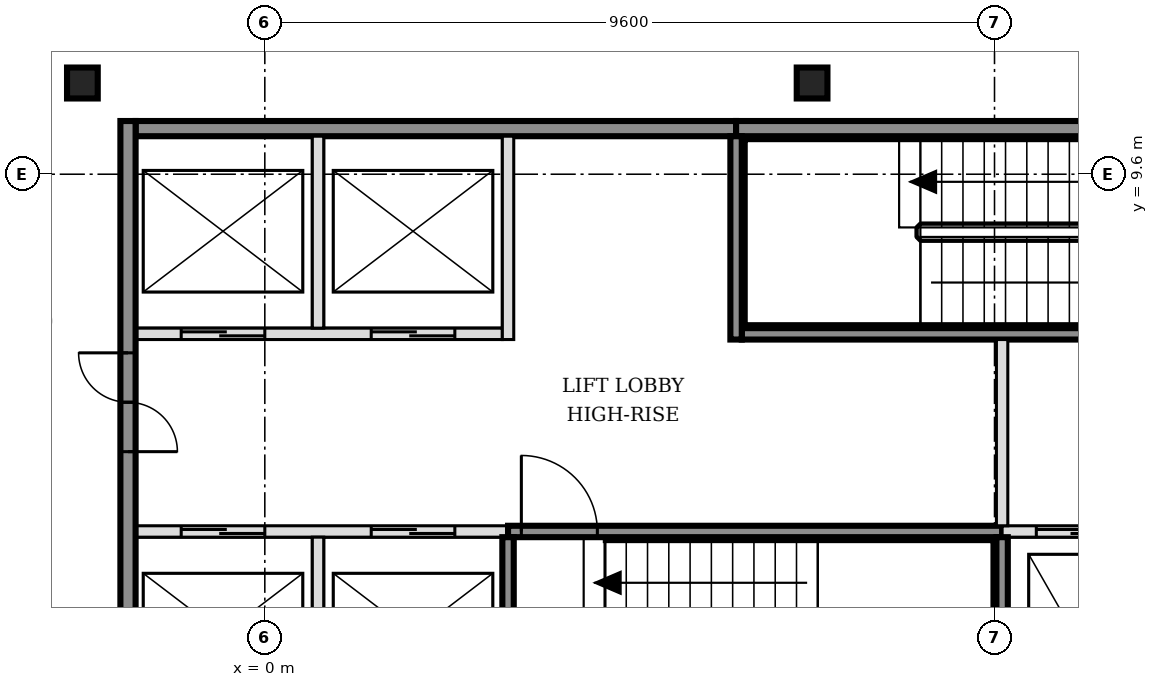
"""IFC4 building model, lengths in metres.
Left out: names, types, materials, properties, quantities, classifications, styles, units other than length and angle.
Written with IfcOpenShell. Run it as: python <this file> out.ifc"""

import sys

from ifc_helpers import new_model, si_unit, direction, frame, frame_2d, origin, origin_2d, place, context, subcontext, project, spatial, rectangle, i_section, extrude, element, fill, save


model = new_model("IFC4")
c1 = context("Model", 3, precision=1e-05, world=origin(), true_north=direction((0.0, 1.0)))
c2 = subcontext(c1, "Body", "Model", "MODEL_VIEW")
j1 = project(units=[si_unit("LENGTHUNIT", "METRE"), si_unit("PLANEANGLEUNIT", "RADIAN")], contexts=[c1])
p1 = place(None, origin())
s1 = spatial("IfcSite", under=j1, at=p1, CompositionType="ELEMENT")
p2 = place(p1, origin())
s2 = spatial("IfcBuilding", under=s1, at=p2, CompositionType="ELEMENT")
p3 = place(p2, frame((0.0, 0.0, 217.8)))
s3 = spatial("IfcBuildingStorey", under=s2, at=p3, CompositionType="ELEMENT", Elevation=217.8)
for number, where, z_axis, x_axis in (
    (1, (-2.4, 10.8, -0.15), (0.0, 0.0, 1.0), (1.0, 0.0, 0.0)),
    (2, (7.2, 10.8, -0.15), (0.0, 0.0, 1.0), (1.0, 0.0, 0.0)),
):
    element("IfcColumn", number, at=place(p3, frame(where, z_axis=z_axis, x_axis=x_axis)), inside=s3, PredefinedType="COLUMN", context=c2, shape_type="SweptSolid", body=[
        extrude(i_section(OverallWidth=0.404, OverallDepth=0.407, WebThickness=0.027, FlangeThickness=0.044, FilletRadius=0.015, at=origin_2d()), origin(), (0.0, 0.0, 1.0), 3.6),
    ])
p4 = place(p3, frame((-1.7, 4.9, 0.0), z_axis=(0.0, 0.0, 1.0), x_axis=(1.0, 0.0, 0.0)))
e3 = element("IfcWall", 3, at=p4, inside=s3, PredefinedType="SOLIDWALL", context=c2, shape_type="SweptSolid", body=[
    extrude(rectangle(XDim=4.9, YDim=0.15, at=frame_2d((2.45, 0.0))), origin(), (0.0, 0.0, 1.0), 3.45),
])
p5 = place(p4, frame((0.6, 0.0, 0.0)))
e4 = element("IfcOpeningElement", 4, at=p5, cuts=e3, PredefinedType="OPENING", context=c2, shape_type="SweptSolid", body=[
    extrude(rectangle(XDim=1.1, YDim=2.1, at=frame_2d((0.55, 1.05))), frame((0.0, 0.085, 0.0), z_axis=(0.0, -1.0, 0.0), x_axis=(1.0, 0.0, 0.0)), (0.0, 0.0, 1.0), 0.17),
])
p6 = place(p4, frame((3.1, 0.0, 0.0)))
e5 = element("IfcOpeningElement", 5, at=p6, cuts=e3, PredefinedType="OPENING", context=c2, shape_type="SweptSolid", body=[
    extrude(rectangle(XDim=1.1, YDim=2.1, at=frame_2d((0.55, 1.05))), frame((0.0, 0.085, 0.0), z_axis=(0.0, -1.0, 0.0), x_axis=(1.0, 0.0, 0.0)), (0.0, 0.0, 1.0), 0.17),
])
p7 = place(p3, frame((3.2, 4.9, 0.0), z_axis=(0.0, 0.0, 1.0), x_axis=(1.0, 0.0, 0.0)))
e6 = element("IfcWall", 6, at=p7, inside=s3, PredefinedType="SOLIDWALL", context=c2, shape_type="SweptSolid", body=[
    extrude(rectangle(XDim=6.5, YDim=0.15, at=frame_2d((3.25, 0.0))), origin(), (0.0, 0.0, 1.0), 3.45),
])
p8 = place(p7, frame((0.175, 0.0, 0.0)))
e7 = element("IfcOpeningElement", 7, at=p8, cuts=e6, PredefinedType="OPENING", context=c2, shape_type="SweptSolid", body=[
    extrude(rectangle(XDim=1.0, YDim=2.1, at=frame_2d((0.5, 1.05))), frame((0.0, 0.085, 0.0), z_axis=(0.0, -1.0, 0.0), x_axis=(1.0, 0.0, 0.0)), (0.0, 0.0, 1.0), 0.17),
])
p9 = place(p3, frame((9.7, 4.9, 0.0), z_axis=(0.0, 0.0, 1.0), x_axis=(1.0, 0.0, 0.0)))
e8 = element("IfcWall", 8, at=p9, inside=s3, PredefinedType="SOLIDWALL", context=c2, shape_type="SweptSolid", body=[
    extrude(rectangle(XDim=6.4, YDim=0.15, at=frame_2d((3.2, 0.0))), origin(), (0.0, 0.0, 1.0), 3.45),
])
p10 = place(p9, frame((0.45, 0.0, 0.0)))
e9 = element("IfcOpeningElement", 9, at=p10, cuts=e8, PredefinedType="OPENING", context=c2, shape_type="SweptSolid", body=[
    extrude(rectangle(XDim=1.0, YDim=2.1, at=frame_2d((0.5, 1.05))), frame((0.0, 0.085, 0.0), z_axis=(0.0, -1.0, 0.0), x_axis=(1.0, 0.0, 0.0)), (0.0, 0.0, 1.0), 0.17),
])
p11 = place(p9, frame((2.35, 0.0, 0.0)))
e10 = element("IfcOpeningElement", 10, at=p11, cuts=e8, PredefinedType="OPENING", context=c2, shape_type="SweptSolid", body=[
    extrude(rectangle(XDim=1.0, YDim=2.1, at=frame_2d((0.5, 1.05))), frame((0.0, 0.085, 0.0), z_axis=(0.0, -1.0, 0.0), x_axis=(1.0, 0.0, 0.0)), (0.0, 0.0, 1.0), 0.17),
])
p12 = place(p9, frame((4.7, 0.0, 0.0)))
e11 = element("IfcOpeningElement", 11, at=p12, cuts=e8, PredefinedType="OPENING", context=c2, shape_type="SweptSolid", body=[
    extrude(rectangle(XDim=0.9, YDim=2.1, at=frame_2d((0.45, 1.05))), frame((0.0, 0.085, 0.0), z_axis=(0.0, -1.0, 0.0), x_axis=(1.0, 0.0, 0.0)), (0.0, 0.0, 1.0), 0.17),
])
p13 = place(p3, frame((-1.7, 7.5, 0.0), z_axis=(0.0, 0.0, 1.0), x_axis=(1.0, 0.0, 0.0)))
e12 = element("IfcWall", 12, at=p13, inside=s3, PredefinedType="SOLIDWALL", context=c2, shape_type="SweptSolid", body=[
    extrude(rectangle(XDim=4.825, YDim=0.15, at=frame_2d((2.413, 0.0))), origin(), (0.0, 0.0, 1.0), 3.45),
])
p14 = place(p13, frame((0.6, 0.0, 0.0)))
e13 = element("IfcOpeningElement", 13, at=p14, cuts=e12, PredefinedType="OPENING", context=c2, shape_type="SweptSolid", body=[
    extrude(rectangle(XDim=1.1, YDim=2.1, at=frame_2d((0.55, 1.05))), frame((0.0, 0.085, 0.0), z_axis=(0.0, -1.0, 0.0), x_axis=(1.0, 0.0, 0.0)), (0.0, 0.0, 1.0), 0.17),
])
p15 = place(p13, frame((3.1, 0.0, 0.0)))
e14 = element("IfcOpeningElement", 14, at=p15, cuts=e12, PredefinedType="OPENING", context=c2, shape_type="SweptSolid", body=[
    extrude(rectangle(XDim=1.1, YDim=2.1, at=frame_2d((0.55, 1.05))), frame((0.0, 0.085, 0.0), z_axis=(0.0, -1.0, 0.0), x_axis=(1.0, 0.0, 0.0)), (0.0, 0.0, 1.0), 0.17),
])
p16 = place(p3, frame((6.275, 7.5, 0.0), z_axis=(0.0, 0.0, 1.0), x_axis=(1.0, 0.0, 0.0)))
e15 = element("IfcWall", 15, at=p16, inside=s3, PredefinedType="SOLIDWALL", context=c2, shape_type="SweptSolid", body=[
    extrude(rectangle(XDim=6.425, YDim=0.15, at=frame_2d((3.212, 0.0))), origin(), (0.0, 0.0, 1.0), 3.45),
])
p17 = place(p16, frame((5.225, 0.0, 0.0)))
e16 = element("IfcOpeningElement", 16, at=p17, cuts=e15, PredefinedType="OPENING", context=c2, shape_type="SweptSolid", body=[
    extrude(rectangle(XDim=1.0, YDim=2.1, at=frame_2d((0.5, 1.05))), frame((0.0, 0.085, 0.0), z_axis=(0.0, -1.0, 0.0), x_axis=(1.0, 0.0, 0.0)), (0.0, 0.0, 1.0), 0.17),
])
p18 = place(p3, frame((-1.7, 10.2, 0.0), z_axis=(0.0, 0.0, 1.0), x_axis=(1.0, 0.0, 0.0)))
e17 = element("IfcWall", 17, at=p18, inside=s3, PredefinedType="SOLIDWALL", context=c2, shape_type="SweptSolid", body=[
    extrude(rectangle(XDim=7.9, YDim=0.2, at=frame_2d((3.95, 0.0))), origin(), (0.0, 0.0, 1.0), 3.45),
])
p19 = place(p3, frame((6.2, 10.2, 0.0), z_axis=(0.0, 0.0, 1.0), x_axis=(1.0, 0.0, 0.0)))
e18 = element("IfcWall", 18, at=p19, inside=s3, PredefinedType="SOLIDWALL", context=c2, shape_type="SweptSolid", body=[
    extrude(rectangle(XDim=6.5, YDim=0.2, at=frame_2d((3.25, 0.0))), origin(), (0.0, 0.0, 1.0), 3.45),
])
p20 = place(p3, frame((-1.8, -5.5, 0.0), z_axis=(0.0, 0.0, 1.0), x_axis=(0.0, 1.0, 0.0)))
e19 = element("IfcWall", 19, at=p20, inside=s3, PredefinedType="SOLIDWALL", context=c2, shape_type="SweptSolid", body=[
    extrude(rectangle(XDim=15.8, YDim=0.2, at=frame_2d((7.9, 0.0))), origin(), (0.0, 0.0, 1.0), 3.45),
])
p21 = place(p20, frame((3.05, 0.0, 0.0)))
e20 = element("IfcOpeningElement", 20, at=p21, cuts=e19, PredefinedType="OPENING", context=c2, shape_type="SweptSolid", body=[
    extrude(rectangle(XDim=1.3, YDim=2.1, at=frame_2d((0.65, 1.05))), frame((0.0, 0.11, 0.0), z_axis=(0.0, -1.0, 0.0), x_axis=(1.0, 0.0, 0.0)), (0.0, 0.0, 1.0), 0.22),
])
p22 = place(p20, frame((11.45, 0.0, 0.0)))
e21 = element("IfcOpeningElement", 21, at=p22, cuts=e19, PredefinedType="OPENING", context=c2, shape_type="SweptSolid", body=[
    extrude(rectangle(XDim=1.3, YDim=2.1, at=frame_2d((0.65, 1.05))), frame((0.0, 0.11, 0.0), z_axis=(0.0, -1.0, 0.0), x_axis=(1.0, 0.0, 0.0)), (0.0, 0.0, 1.0), 0.22),
])
p23 = place(p3, frame((0.7, 2.275, 0.0), z_axis=(0.0, 0.0, 1.0), x_axis=(0.0, 1.0, 0.0)))
e22 = element("IfcWall", 22, at=p23, inside=s3, PredefinedType="SOLIDWALL", context=c2, shape_type="SweptSolid", body=[
    extrude(rectangle(XDim=2.55, YDim=0.15, at=frame_2d((1.275, 0.0))), origin(), (0.0, 0.0, 1.0), 3.45),
])
p24 = place(p3, frame((0.7, 7.575, 0.0), z_axis=(0.0, 0.0, 1.0), x_axis=(0.0, 1.0, 0.0)))
e23 = element("IfcWall", 23, at=p24, inside=s3, PredefinedType="SOLIDWALL", context=c2, shape_type="SweptSolid", body=[
    extrude(rectangle(XDim=2.525, YDim=0.15, at=frame_2d((1.263, 0.0))), origin(), (0.0, 0.0, 1.0), 3.45),
])
p25 = place(p3, frame((3.2, 2.275, 0.0), z_axis=(0.0, 0.0, 1.0), x_axis=(0.0, 1.0, 0.0)))
e24 = element("IfcWall", 24, at=p25, inside=s3, PredefinedType="SOLIDWALL", context=c2, shape_type="SweptSolid", body=[
    extrude(rectangle(XDim=2.55, YDim=0.15, at=frame_2d((1.275, 0.0))), origin(), (0.0, 0.0, 1.0), 3.45),
])
for number, where, z_axis, x_axis in (
    (25, (3.2, 7.425, 0.0), (0.0, 0.0, 1.0), (0.0, 1.0, 0.0)),
    (26, (6.2, 7.425, 0.0), (0.0, 0.0, 1.0), (0.0, 1.0, 0.0)),
):
    element("IfcWall", number, at=place(p3, frame(where, z_axis=z_axis, x_axis=x_axis)), inside=s3, PredefinedType="SOLIDWALL", context=c2, shape_type="SweptSolid", body=[
        extrude(rectangle(XDim=2.675, YDim=0.15, at=frame_2d((1.337, 0.0))), origin(), (0.0, 0.0, 1.0), 3.45),
    ])
p26 = place(p3, frame((9.7, 2.275, 0.0), z_axis=(0.0, 0.0, 1.0), x_axis=(0.0, 1.0, 0.0)))
e27 = element("IfcWall", 27, at=p26, inside=s3, PredefinedType="SOLIDWALL", context=c2, shape_type="SweptSolid", body=[
    extrude(rectangle(XDim=2.55, YDim=0.15, at=frame_2d((1.275, 0.0))), origin(), (0.0, 0.0, 1.0), 3.45),
])
p27 = place(p3, frame((9.7, 4.975, 0.0), z_axis=(0.0, 0.0, 1.0), x_axis=(0.0, 1.0, 0.0)))
e28 = element("IfcWall", 28, at=p27, inside=s3, PredefinedType="SOLIDWALL", context=c2, shape_type="SweptSolid", body=[
    extrude(rectangle(XDim=2.45, YDim=0.15, at=frame_2d((1.225, 0.0))), origin(), (0.0, 0.0, 1.0), 3.45),
])
p28 = place(p5, origin())
e29 = element("IfcDoor", 29, at=p28, inside=s3, OperationType="DOUBLE_DOOR_SLIDING", PredefinedType="DOOR", context=c2, shape_type="SweptSolid", body=[
    extrude(rectangle(XDim=1.1, YDim=2.1, at=frame_2d((0.55, 1.05))), frame((0.0, 0.025, 0.0), z_axis=(0.0, -1.0, 0.0), x_axis=(1.0, 0.0, 0.0)), (0.0, 0.0, 1.0), 0.05),
])
fill(e4, e29)
p29 = place(p6, origin())
e30 = element("IfcDoor", 30, at=p29, inside=s3, OperationType="DOUBLE_DOOR_SLIDING", PredefinedType="DOOR", context=c2, shape_type="SweptSolid", body=[
    extrude(rectangle(XDim=1.1, YDim=2.1, at=frame_2d((0.55, 1.05))), frame((0.0, 0.025, 0.0), z_axis=(0.0, -1.0, 0.0), x_axis=(1.0, 0.0, 0.0)), (0.0, 0.0, 1.0), 0.05),
])
fill(e5, e30)
p30 = place(p14, origin())
e31 = element("IfcDoor", 31, at=p30, inside=s3, OperationType="DOUBLE_DOOR_SLIDING", PredefinedType="DOOR", context=c2, shape_type="SweptSolid", body=[
    extrude(rectangle(XDim=1.1, YDim=2.1, at=frame_2d((0.55, 1.05))), frame((0.0, 0.025, 0.0), z_axis=(0.0, -1.0, 0.0), x_axis=(1.0, 0.0, 0.0)), (0.0, 0.0, 1.0), 0.05),
])
fill(e13, e31)
p31 = place(p15, origin())
e32 = element("IfcDoor", 32, at=p31, inside=s3, OperationType="DOUBLE_DOOR_SLIDING", PredefinedType="DOOR", context=c2, shape_type="SweptSolid", body=[
    extrude(rectangle(XDim=1.1, YDim=2.1, at=frame_2d((0.55, 1.05))), frame((0.0, 0.025, 0.0), z_axis=(0.0, -1.0, 0.0), x_axis=(1.0, 0.0, 0.0)), (0.0, 0.0, 1.0), 0.05),
])
fill(e14, e32)
p32 = place(p10, origin())
e33 = element("IfcDoor", 33, at=p32, inside=s3, OperationType="DOUBLE_DOOR_SLIDING", PredefinedType="DOOR", context=c2, shape_type="SweptSolid", body=[
    extrude(rectangle(XDim=1.0, YDim=2.1, at=frame_2d((0.5, 1.05))), frame((0.0, 0.025, 0.0), z_axis=(0.0, -1.0, 0.0), x_axis=(1.0, 0.0, 0.0)), (0.0, 0.0, 1.0), 0.05),
])
fill(e9, e33)
p33 = place(p8, origin())
e34 = element("IfcDoor", 34, at=p33, inside=s3, OperationType="SINGLE_SWING_LEFT", PredefinedType="DOOR", context=c2, shape_type="SweptSolid", body=[
    extrude(rectangle(XDim=1.0, YDim=2.1, at=frame_2d((0.5, 1.05))), frame((0.0, 0.025, 0.0), z_axis=(0.0, -1.0, 0.0), x_axis=(1.0, 0.0, 0.0)), (0.0, 0.0, 1.0), 0.05),
])
fill(e7, e34)
p34 = place(p22, origin())
e35 = element("IfcDoor", 35, at=p34, inside=s3, OperationType="DOUBLE_DOOR_SINGLE_SWING", PredefinedType="DOOR", context=c2, shape_type="SweptSolid", body=[
    extrude(rectangle(XDim=1.3, YDim=2.1, at=frame_2d((0.65, 1.05))), frame((0.0, 0.025, 0.0), z_axis=(0.0, -1.0, 0.0), x_axis=(1.0, 0.0, 0.0)), (0.0, 0.0, 1.0), 0.05),
])
fill(e21, e35)
save(model, sys.argv[1])
